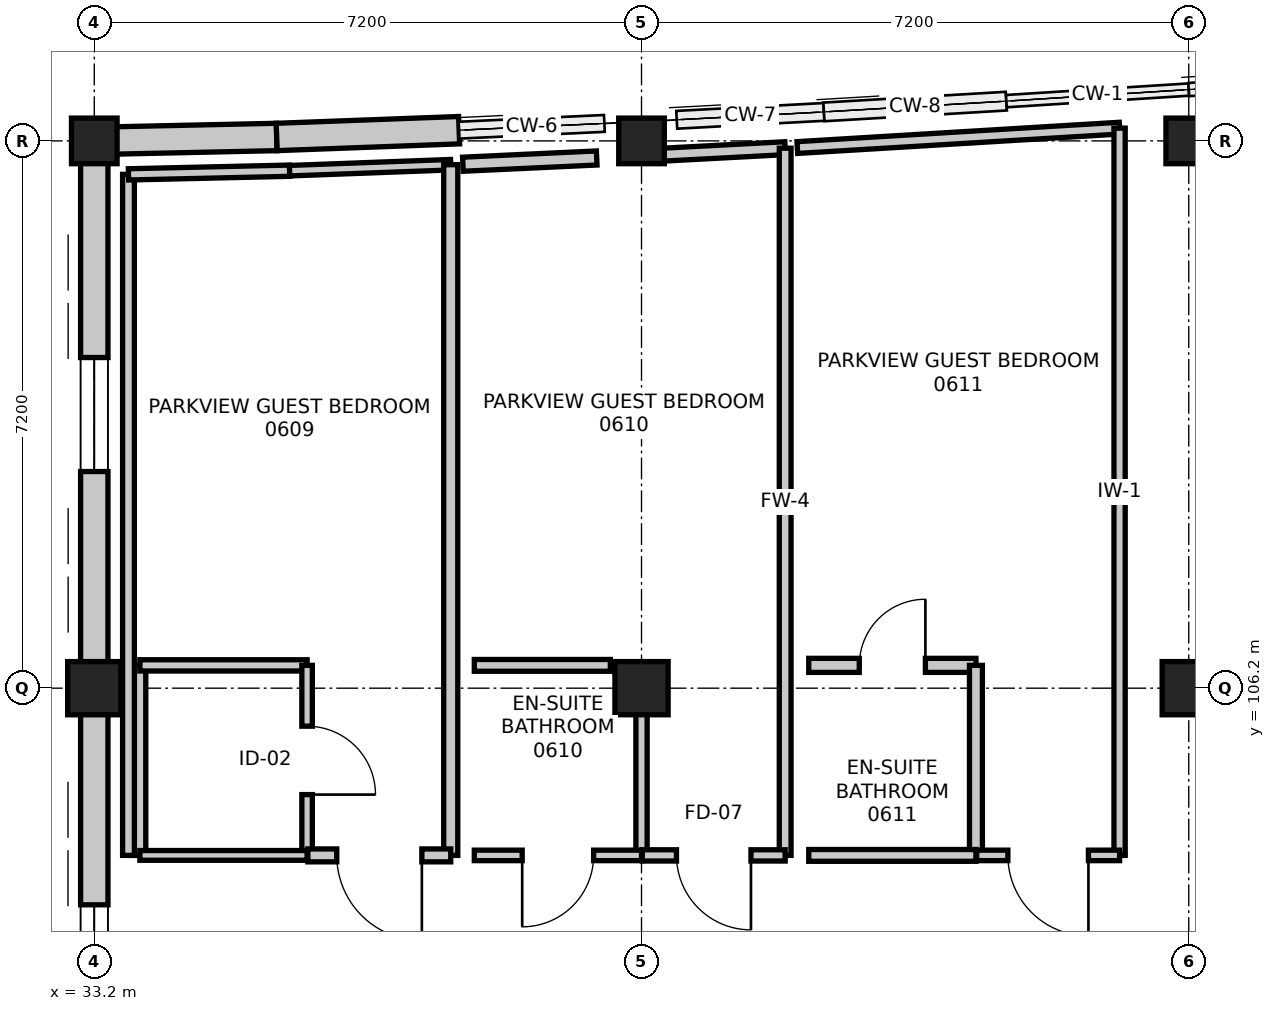
"""IFC4 building model, lengths in metres.
Left out: names, types, materials, properties, quantities, classifications, styles, units other than length and angle.
Written with IfcOpenShell. Run it as: python <this file> out.ifc"""

import sys

from ifc_helpers import new_model, si_unit, direction, frame, frame_2d, origin, origin_2d, place, context, subcontext, project, spatial, rectangle, extrude, element, fill, save


model = new_model("IFC4")
c1 = context("Model", 3, precision=1e-05, world=origin(), true_north=direction((0.0, 1.0)))
c2 = subcontext(c1, "Body", "Model", "MODEL_VIEW")
j1 = project(units=[si_unit("LENGTHUNIT", "METRE"), si_unit("PLANEANGLEUNIT", "RADIAN")], contexts=[c1])
p1 = place(None, origin())
s1 = spatial("IfcSite", under=j1, at=p1, CompositionType="ELEMENT")
p2 = place(p1, origin())
s2 = spatial("IfcBuilding", under=s1, at=p2, CompositionType="ELEMENT")
p3 = place(p2, frame((0.0, 0.0, 26.4)))
s3 = spatial("IfcBuildingStorey", under=s2, at=p3, CompositionType="ELEMENT", Elevation=26.4)
p4 = place(p3, frame((33.2, 106.2, 0.0), z_axis=(0.0, 0.0, 1.0), x_axis=(1.0, 0.0, 0.0)))
e1 = element("IfcColumn", 1, at=p4, inside=s3, PredefinedType="COLUMN", context=c2, shape_type="SweptSolid", body=[
    extrude(rectangle(XDim=0.7, YDim=0.7, at=origin_2d()), origin(), (0.0, 0.0, 1.0), 3.6),
])
p5 = place(p3, frame((33.2, 113.4, 0.0), z_axis=(0.0, 0.0, 1.0), x_axis=(1.0, 0.0, 0.0)))
e2 = element("IfcColumn", 2, at=p5, inside=s3, PredefinedType="COLUMN", context=c2, shape_type="SweptSolid", body=[
    extrude(rectangle(XDim=0.6, YDim=0.6, at=origin_2d()), origin(), (0.0, 0.0, 1.0), 3.6),
])
p6 = place(p3, frame((40.4, 106.2, 0.0), z_axis=(0.0, 0.0, 1.0), x_axis=(1.0, 0.0, 0.0)))
e3 = element("IfcColumn", 3, at=p6, inside=s3, PredefinedType="COLUMN", context=c2, shape_type="SweptSolid", body=[
    extrude(rectangle(XDim=0.7, YDim=0.7, at=origin_2d()), origin(), (0.0, 0.0, 1.0), 3.6),
])
p7 = place(p3, frame((40.4, 113.4, 0.0), z_axis=(0.0, 0.0, 1.0), x_axis=(1.0, 0.0, 0.0)))
e4 = element("IfcColumn", 4, at=p7, inside=s3, PredefinedType="COLUMN", context=c2, shape_type="SweptSolid", body=[
    extrude(rectangle(XDim=0.6, YDim=0.6, at=origin_2d()), origin(), (0.0, 0.0, 1.0), 3.6),
])
p8 = place(p3, frame((47.6, 106.2, 0.0), z_axis=(0.0, 0.0, 1.0), x_axis=(1.0, 0.0, 0.0)))
e5 = element("IfcColumn", 5, at=p8, inside=s3, PredefinedType="COLUMN", context=c2, shape_type="SweptSolid", body=[
    extrude(rectangle(XDim=0.7, YDim=0.7, at=origin_2d()), origin(), (0.0, 0.0, 1.0), 3.6),
])
p9 = place(p3, frame((47.6, 113.4, 0.0), z_axis=(0.0, 0.0, 1.0), x_axis=(1.0, 0.0, 0.0)))
e6 = element("IfcColumn", 6, at=p9, inside=s3, PredefinedType="COLUMN", context=c2, shape_type="SweptSolid", body=[
    extrude(rectangle(XDim=0.6, YDim=0.6, at=origin_2d()), origin(), (0.0, 0.0, 1.0), 3.6),
])
p10 = place(p3, frame((33.2, 113.4, 0.0), z_axis=(0.0, 0.0, 1.0), x_axis=(0.999767568547, 0.021559426766, 0.0)))
e7 = element("IfcWall", 7, at=p10, inside=s3, PredefinedType="STANDARD", context=c2, shape_type="SweptSolid", body=[
    extrude(rectangle(XDim=2.401, YDim=0.36, at=frame_2d((1.2, 0.0))), origin(), (0.0, 0.0, 1.0), 2.735),
])
p11 = place(p3, frame((35.6, 113.452, 0.0), z_axis=(0.0, 0.0, 1.0), x_axis=(0.99930757318, 0.037207179225, 0.0)))
e8 = element("IfcWall", 8, at=p11, inside=s3, PredefinedType="STANDARD", context=c2, shape_type="SweptSolid", body=[
    extrude(rectangle(XDim=2.402, YDim=0.36, at=frame_2d((1.201, 0.0))), origin(), (0.0, 0.0, 1.0), 2.735),
])
p12 = place(p3, frame((33.2, 99.0, 0.0), z_axis=(0.0, 0.0, 1.0), x_axis=(0.0, 1.0, 0.0)))
e9 = element("IfcWall", 9, at=p12, inside=s3, PredefinedType="STANDARD", context=c2, shape_type="SweptSolid", body=[
    extrude(rectangle(XDim=7.2, YDim=0.36, at=frame_2d((3.6, 0.0))), origin(), (0.0, 0.0, 1.0), 2.685),
])
p13 = place(p12, frame((2.85, 0.0, 0.75)))
e10 = element("IfcOpeningElement", 10, at=p13, cuts=e9, PredefinedType="OPENING", context=c2, shape_type="SweptSolid", body=[
    extrude(rectangle(XDim=1.5, YDim=1.5, at=frame_2d((0.75, 0.75))), frame((0.0, 0.19, 0.0), z_axis=(0.0, -1.0, 0.0), x_axis=(1.0, 0.0, 0.0)), (0.0, 0.0, 1.0), 0.38),
])
p14 = place(p3, frame((33.2, 106.2, 0.0), z_axis=(0.0, 0.0, 1.0), x_axis=(0.0, 1.0, 0.0)))
e11 = element("IfcWall", 11, at=p14, inside=s3, PredefinedType="STANDARD", context=c2, shape_type="SweptSolid", body=[
    extrude(rectangle(XDim=7.2, YDim=0.36, at=frame_2d((3.6, 0.0))), origin(), (0.0, 0.0, 1.0), 2.685),
])
p15 = place(p14, frame((2.85, 0.0, 0.75)))
e12 = element("IfcOpeningElement", 12, at=p15, cuts=e11, PredefinedType="OPENING", context=c2, shape_type="SweptSolid", body=[
    extrude(rectangle(XDim=1.5, YDim=1.5, at=frame_2d((0.75, 0.75))), frame((0.0, 0.19, 0.0), z_axis=(0.0, -1.0, 0.0), x_axis=(1.0, 0.0, 0.0)), (0.0, 0.0, 1.0), 0.38),
])
p16 = place(p3, frame((33.8, 104.0, 0.0), z_axis=(0.0, 0.0, 1.0), x_axis=(0.0, 1.0, 0.0)))
e13 = element("IfcWall", 13, at=p16, inside=s3, PredefinedType="PARTITIONING", context=c2, shape_type="SweptSolid", body=[
    extrude(rectangle(XDim=2.5, YDim=0.155, at=frame_2d((1.25, 0.0))), origin(), (0.0, 0.0, 1.0), 2.735),
])
p17 = place(p3, frame((33.8, 106.5, 0.0), z_axis=(0.0, 0.0, 1.0), x_axis=(1.0, 0.0, 0.0)))
e14 = element("IfcWall", 14, at=p17, inside=s3, PredefinedType="PARTITIONING", context=c2, shape_type="SweptSolid", body=[
    extrude(rectangle(XDim=2.2, YDim=0.148, at=frame_2d((1.1, 0.0))), origin(), (0.0, 0.0, 1.0), 3.35),
])
p18 = place(p3, frame((36.0, 106.5, 0.0), z_axis=(0.0, 0.0, 1.0), x_axis=(0.0, -1.0, 0.0)))
e15 = element("IfcWall", 15, at=p18, inside=s3, PredefinedType="PARTITIONING", context=c2, shape_type="SweptSolid", body=[
    extrude(rectangle(XDim=2.5, YDim=0.138, at=frame_2d((1.25, 0.0))), origin(), (0.0, 0.0, 1.0), 2.735),
])
p19 = place(p18, frame((0.8, 0.0, 0.0)))
e16 = element("IfcOpeningElement", 16, at=p19, cuts=e15, PredefinedType="OPENING", context=c2, shape_type="SweptSolid", body=[
    extrude(rectangle(XDim=0.9, YDim=2.08, at=frame_2d((0.45, 1.04))), frame((0.0, 0.079, 0.0), z_axis=(0.0, -1.0, 0.0), x_axis=(1.0, 0.0, 0.0)), (0.0, 0.0, 1.0), 0.158),
])
p20 = place(p3, frame((36.0, 104.0, 0.0), z_axis=(0.0, 0.0, 1.0), x_axis=(-1.0, 0.0, 0.0)))
e17 = element("IfcWall", 17, at=p20, inside=s3, PredefinedType="PARTITIONING", context=c2, shape_type="SweptSolid", body=[
    extrude(rectangle(XDim=2.2, YDim=0.128, at=frame_2d((1.1, 0.0))), origin(), (0.0, 0.0, 1.0), 3.35),
])
p21 = place(p3, frame((33.65, 104.0, 0.0), z_axis=(0.0, 0.0, 1.0), x_axis=(0.0, 1.0, 0.0)))
e18 = element("IfcWall", 18, at=p21, inside=s3, PredefinedType="PARTITIONING", context=c2, shape_type="SweptSolid", body=[
    extrude(rectangle(XDim=8.96, YDim=0.155, at=frame_2d((4.48, 0.0))), origin(), (0.0, 0.0, 1.0), 2.735),
])
p22 = place(p3, frame((33.65, 112.96, 0.0), z_axis=(0.0, 0.0, 1.0), x_axis=(0.999740168701, 0.022794628443, 0.0)))
e19 = element("IfcWall", 19, at=p22, inside=s3, PredefinedType="PARTITIONING", context=c2, shape_type="SweptSolid", body=[
    extrude(rectangle(XDim=2.121, YDim=0.148, at=frame_2d((1.06, 0.0))), origin(), (0.0, 0.0, 1.0), 3.35),
])
p23 = place(p3, frame((35.77, 113.008, 0.0), z_axis=(0.0, 0.0, 1.0), x_axis=(0.999308829795, 0.0371734138, 0.0)))
e20 = element("IfcWall", 20, at=p23, inside=s3, PredefinedType="PARTITIONING", context=c2, shape_type="SweptSolid", body=[
    extrude(rectangle(XDim=2.121, YDim=0.138, at=frame_2d((1.061, 0.0))), origin(), (0.0, 0.0, 1.0), 3.35),
])
p24 = place(p3, frame((37.89, 113.087, 0.0), z_axis=(0.0, 0.0, 1.0), x_axis=(0.0, -1.0, 0.0)))
e21 = element("IfcWall", 21, at=p24, inside=s3, PredefinedType="PARTITIONING", context=c2, shape_type="SweptSolid", body=[
    extrude(rectangle(XDim=9.087, YDim=0.185, at=frame_2d((4.543, 0.0))), origin(), (0.0, 0.0, 1.0), 2.735),
])
p25 = place(p3, frame((37.89, 104.0, 0.0), z_axis=(0.0, 0.0, 1.0), x_axis=(-1.0, 0.0, 0.0)))
e22 = element("IfcWall", 22, at=p25, inside=s3, PredefinedType="PARTITIONING", context=c2, shape_type="SweptSolid", body=[
    extrude(rectangle(XDim=1.88, YDim=0.17, at=frame_2d((0.94, 0.0))), origin(), (0.0, 0.0, 1.0), 3.35),
])
p26 = place(p25, frame((0.38, 0.0, 0.0)))
e23 = element("IfcOpeningElement", 23, at=p26, cuts=e22, PredefinedType="OPENING", context=c2, shape_type="SweptSolid", body=[
    extrude(rectangle(XDim=1.12, YDim=2.2, at=frame_2d((0.56, 1.1))), frame((0.0, 0.095, 0.0), z_axis=(0.0, -1.0, 0.0), x_axis=(1.0, 0.0, 0.0)), (0.0, 0.0, 1.0), 0.19),
])
p27 = place(p3, frame((38.2, 106.5, 0.0), z_axis=(0.0, 0.0, 1.0), x_axis=(1.0, 0.0, 0.0)))
e24 = element("IfcWall", 24, at=p27, inside=s3, PredefinedType="PARTITIONING", context=c2, shape_type="SweptSolid", body=[
    extrude(rectangle(XDim=1.79, YDim=0.155, at=frame_2d((0.895, 0.0))), origin(), (0.0, 0.0, 1.0), 3.35),
])
p28 = place(p3, frame((40.4, 106.09, 0.0), z_axis=(0.0, 0.0, 1.0), x_axis=(0.0, -1.0, 0.0)))
e25 = element("IfcWall", 25, at=p28, inside=s3, PredefinedType="PARTITIONING", context=c2, shape_type="SweptSolid", body=[
    extrude(rectangle(XDim=2.09, YDim=0.148, at=frame_2d((1.045, 0.0))), origin(), (0.0, 0.0, 1.0), 2.685),
])
p29 = place(p3, frame((40.4, 104.0, 0.0), z_axis=(0.0, 0.0, 1.0), x_axis=(-1.0, 0.0, 0.0)))
e26 = element("IfcWall", 26, at=p29, inside=s3, PredefinedType="PARTITIONING", context=c2, shape_type="SweptSolid", body=[
    extrude(rectangle(XDim=2.2, YDim=0.138, at=frame_2d((1.1, 0.0))), origin(), (0.0, 0.0, 1.0), 2.685),
])
p30 = place(p29, frame((0.63, 0.0, 0.0)))
e27 = element("IfcOpeningElement", 27, at=p30, cuts=e26, PredefinedType="OPENING", context=c2, shape_type="SweptSolid", body=[
    extrude(rectangle(XDim=0.94, YDim=2.12, at=frame_2d((0.47, 1.06))), frame((0.0, 0.079, 0.0), z_axis=(0.0, -1.0, 0.0), x_axis=(1.0, 0.0, 0.0)), (0.0, 0.0, 1.0), 0.158),
])
p31 = place(p3, frame((38.05, 113.093, 0.0), z_axis=(0.0, 0.0, 1.0), x_axis=(0.99891589499, 0.046551420349, 0.0)))
e28 = element("IfcWall", 28, at=p31, inside=s3, PredefinedType="PARTITIONING", context=c2, shape_type="SweptSolid", body=[
    extrude(rectangle(XDim=1.762, YDim=0.185, at=frame_2d((0.881, 0.0))), origin(), (0.0, 0.0, 1.0), 2.735),
])
p32 = place(p3, frame((40.53, 113.211, 0.0), z_axis=(0.0, 0.0, 1.0), x_axis=(0.998607097136, 0.052762349745, 0.0)))
e29 = element("IfcWall", 29, at=p32, inside=s3, PredefinedType="PARTITIONING", context=c2, shape_type="SweptSolid", body=[
    extrude(rectangle(XDim=1.763, YDim=0.17, at=frame_2d((0.881, 0.0))), origin(), (0.0, 0.0, 1.0), 2.735),
])
p33 = place(p3, frame((42.29, 113.304, 0.0), z_axis=(0.0, 0.0, 1.0), x_axis=(0.0, -1.0, 0.0)))
e30 = element("IfcWall", 30, at=p33, inside=s3, PredefinedType="PARTITIONING", context=c2, shape_type="SweptSolid", body=[
    extrude(rectangle(XDim=9.304, YDim=0.155, at=frame_2d((4.652, 0.0))), origin(), (0.0, 0.0, 1.0), 2.735),
])
p34 = place(p3, frame((42.29, 104.0, 0.0), z_axis=(0.0, 0.0, 1.0), x_axis=(-1.0, 0.0, 0.0)))
e31 = element("IfcWall", 31, at=p34, inside=s3, PredefinedType="PARTITIONING", context=c2, shape_type="SweptSolid", body=[
    extrude(rectangle(XDim=1.88, YDim=0.148, at=frame_2d((0.94, 0.0))), origin(), (0.0, 0.0, 1.0), 2.685),
])
p35 = place(p34, frame((0.45, 0.0, 0.0)))
e32 = element("IfcOpeningElement", 32, at=p35, cuts=e31, PredefinedType="OPENING", context=c2, shape_type="SweptSolid", body=[
    extrude(rectangle(XDim=0.98, YDim=2.15, at=frame_2d((0.49, 1.075))), frame((0.0, 0.084, 0.0), z_axis=(0.0, -1.0, 0.0), x_axis=(1.0, 0.0, 0.0)), (0.0, 0.0, 1.0), 0.168),
])
p36 = place(p3, frame((42.6, 106.5, 0.0), z_axis=(0.0, 0.0, 1.0), x_axis=(1.0, 0.0, 0.0)))
e33 = element("IfcWall", 33, at=p36, inside=s3, PredefinedType="PARTITIONING", context=c2, shape_type="SweptSolid", body=[
    extrude(rectangle(XDim=2.2, YDim=0.185, at=frame_2d((1.1, 0.0))), origin(), (0.0, 0.0, 1.0), 2.735),
])
p37 = place(p36, frame((0.665, 0.0, 0.0)))
e34 = element("IfcOpeningElement", 34, at=p37, cuts=e33, PredefinedType="OPENING", context=c2, shape_type="SweptSolid", body=[
    extrude(rectangle(XDim=0.87, YDim=2.07, at=frame_2d((0.435, 1.035))), frame((0.0, 0.103, 0.0), z_axis=(0.0, -1.0, 0.0), x_axis=(1.0, 0.0, 0.0)), (0.0, 0.0, 1.0), 0.205),
])
p38 = place(p3, frame((44.8, 106.5, 0.0), z_axis=(0.0, 0.0, 1.0), x_axis=(0.0, -1.0, 0.0)))
e35 = element("IfcWall", 35, at=p38, inside=s3, PredefinedType="PARTITIONING", context=c2, shape_type="SweptSolid", body=[
    extrude(rectangle(XDim=2.5, YDim=0.17, at=frame_2d((1.25, 0.0))), origin(), (0.0, 0.0, 1.0), 2.735),
])
p39 = place(p3, frame((44.8, 104.0, 0.0), z_axis=(0.0, 0.0, 1.0), x_axis=(-1.0, 0.0, 0.0)))
e36 = element("IfcWall", 36, at=p39, inside=s3, PredefinedType="PARTITIONING", context=c2, shape_type="SweptSolid", body=[
    extrude(rectangle(XDim=2.2, YDim=0.155, at=frame_2d((1.1, 0.0))), origin(), (0.0, 0.0, 1.0), 3.35),
])
p40 = place(p3, frame((42.45, 113.312, 0.0), z_axis=(0.0, 0.0, 1.0), x_axis=(0.99819459094, 0.060062955463, 0.0)))
e37 = element("IfcWall", 37, at=p40, inside=s3, PredefinedType="PARTITIONING", context=c2, shape_type="SweptSolid", body=[
    extrude(rectangle(XDim=4.248, YDim=0.155, at=frame_2d((2.124, 0.0))), origin(), (0.0, 0.0, 1.0), 2.735),
])
p41 = place(p3, frame((46.69, 113.568, 0.0), z_axis=(0.0, 0.0, 1.0), x_axis=(0.0, -1.0, 0.0)))
e38 = element("IfcWall", 38, at=p41, inside=s3, PredefinedType="PARTITIONING", context=c2, shape_type="SweptSolid", body=[
    extrude(rectangle(XDim=9.568, YDim=0.148, at=frame_2d((4.784, 0.0))), origin(), (0.0, 0.0, 1.0), 2.735),
])
p42 = place(p3, frame((46.69, 104.0, 0.0), z_axis=(0.0, 0.0, 1.0), x_axis=(-1.0, 0.0, 0.0)))
e39 = element("IfcWall", 39, at=p42, inside=s3, PredefinedType="PARTITIONING", context=c2, shape_type="SweptSolid", body=[
    extrude(rectangle(XDim=1.88, YDim=0.138, at=frame_2d((0.94, 0.0))), origin(), (0.0, 0.0, 1.0), 3.35),
])
p43 = place(p42, frame((0.41, 0.0, 0.0)))
e40 = element("IfcOpeningElement", 40, at=p43, cuts=e39, PredefinedType="OPENING", context=c2, shape_type="SweptSolid", body=[
    extrude(rectangle(XDim=1.06, YDim=2.2, at=frame_2d((0.53, 1.1))), frame((0.0, 0.079, 0.0), z_axis=(0.0, -1.0, 0.0), x_axis=(1.0, 0.0, 0.0)), (0.0, 0.0, 1.0), 0.158),
])
p44 = place(p13, origin())
e41 = element("IfcWindow", 41, at=p44, inside=s3, PartitioningType="SINGLE_PANEL", PredefinedType="WINDOW", context=c2, shape_type="SweptSolid", body=[
    extrude(rectangle(XDim=1.5, YDim=1.5, at=frame_2d((0.75, 0.75))), frame((0.0, 0.03, 0.0), z_axis=(0.0, -1.0, 0.0), x_axis=(1.0, 0.0, 0.0)), (0.0, 0.0, 1.0), 0.06),
])
fill(e10, e41)
p45 = place(p15, origin())
e42 = element("IfcWindow", 42, at=p45, inside=s3, PartitioningType="SINGLE_PANEL", PredefinedType="WINDOW", context=c2, shape_type="SweptSolid", body=[
    extrude(rectangle(XDim=1.5, YDim=1.5, at=frame_2d((0.75, 0.75))), frame((0.0, 0.03, 0.0), z_axis=(0.0, -1.0, 0.0), x_axis=(1.0, 0.0, 0.0)), (0.0, 0.0, 1.0), 0.06),
])
fill(e12, e42)
p46 = place(p19, origin())
e43 = element("IfcDoor", 43, at=p46, inside=s3, OperationType="SINGLE_SWING_RIGHT", PredefinedType="DOOR", context=c2, shape_type="SweptSolid", body=[
    extrude(rectangle(XDim=0.9, YDim=2.08, at=frame_2d((0.45, 1.04))), frame((0.0, 0.025, 0.0), z_axis=(0.0, -1.0, 0.0), x_axis=(1.0, 0.0, 0.0)), (0.0, 0.0, 1.0), 0.05),
])
fill(e16, e43)
p47 = place(p26, origin())
e44 = element("IfcDoor", 44, at=p47, inside=s3, OperationType="SINGLE_SWING_LEFT", PredefinedType="DOOR", context=c2, shape_type="SweptSolid", body=[
    extrude(rectangle(XDim=1.12, YDim=2.2, at=frame_2d((0.56, 1.1))), frame((0.0, 0.025, 0.0), z_axis=(0.0, -1.0, 0.0), x_axis=(1.0, 0.0, 0.0)), (0.0, 0.0, 1.0), 0.05),
])
fill(e23, e44)
p48 = place(p30, origin())
e45 = element("IfcDoor", 45, at=p48, inside=s3, OperationType="SINGLE_SWING_RIGHT", PredefinedType="DOOR", context=c2, shape_type="SweptSolid", body=[
    extrude(rectangle(XDim=0.94, YDim=2.12, at=frame_2d((0.47, 1.06))), frame((0.0, 0.025, 0.0), z_axis=(0.0, -1.0, 0.0), x_axis=(1.0, 0.0, 0.0)), (0.0, 0.0, 1.0), 0.05),
])
fill(e27, e45)
p49 = place(p35, origin())
e46 = element("IfcDoor", 46, at=p49, inside=s3, OperationType="SINGLE_SWING_LEFT", PredefinedType="DOOR", context=c2, shape_type="SweptSolid", body=[
    extrude(rectangle(XDim=0.98, YDim=2.15, at=frame_2d((0.49, 1.075))), frame((0.0, 0.025, 0.0), z_axis=(0.0, -1.0, 0.0), x_axis=(1.0, 0.0, 0.0)), (0.0, 0.0, 1.0), 0.05),
])
fill(e32, e46)
p50 = place(p37, origin())
e47 = element("IfcDoor", 47, at=p50, inside=s3, OperationType="SINGLE_SWING_RIGHT", PredefinedType="DOOR", context=c2, shape_type="SweptSolid", body=[
    extrude(rectangle(XDim=0.87, YDim=2.07, at=frame_2d((0.435, 1.035))), frame((0.0, 0.025, 0.0), z_axis=(0.0, -1.0, 0.0), x_axis=(1.0, 0.0, 0.0)), (0.0, 0.0, 1.0), 0.05),
])
fill(e34, e47)
p51 = place(p43, origin())
e48 = element("IfcDoor", 48, at=p51, inside=s3, OperationType="SINGLE_SWING_LEFT", PredefinedType="DOOR", context=c2, shape_type="SweptSolid", body=[
    extrude(rectangle(XDim=1.06, YDim=2.2, at=frame_2d((0.53, 1.1))), frame((0.0, 0.025, 0.0), z_axis=(0.0, -1.0, 0.0), x_axis=(1.0, 0.0, 0.0)), (0.0, 0.0, 1.0), 0.05),
])
fill(e40, e48)
save(model, sys.argv[1])
